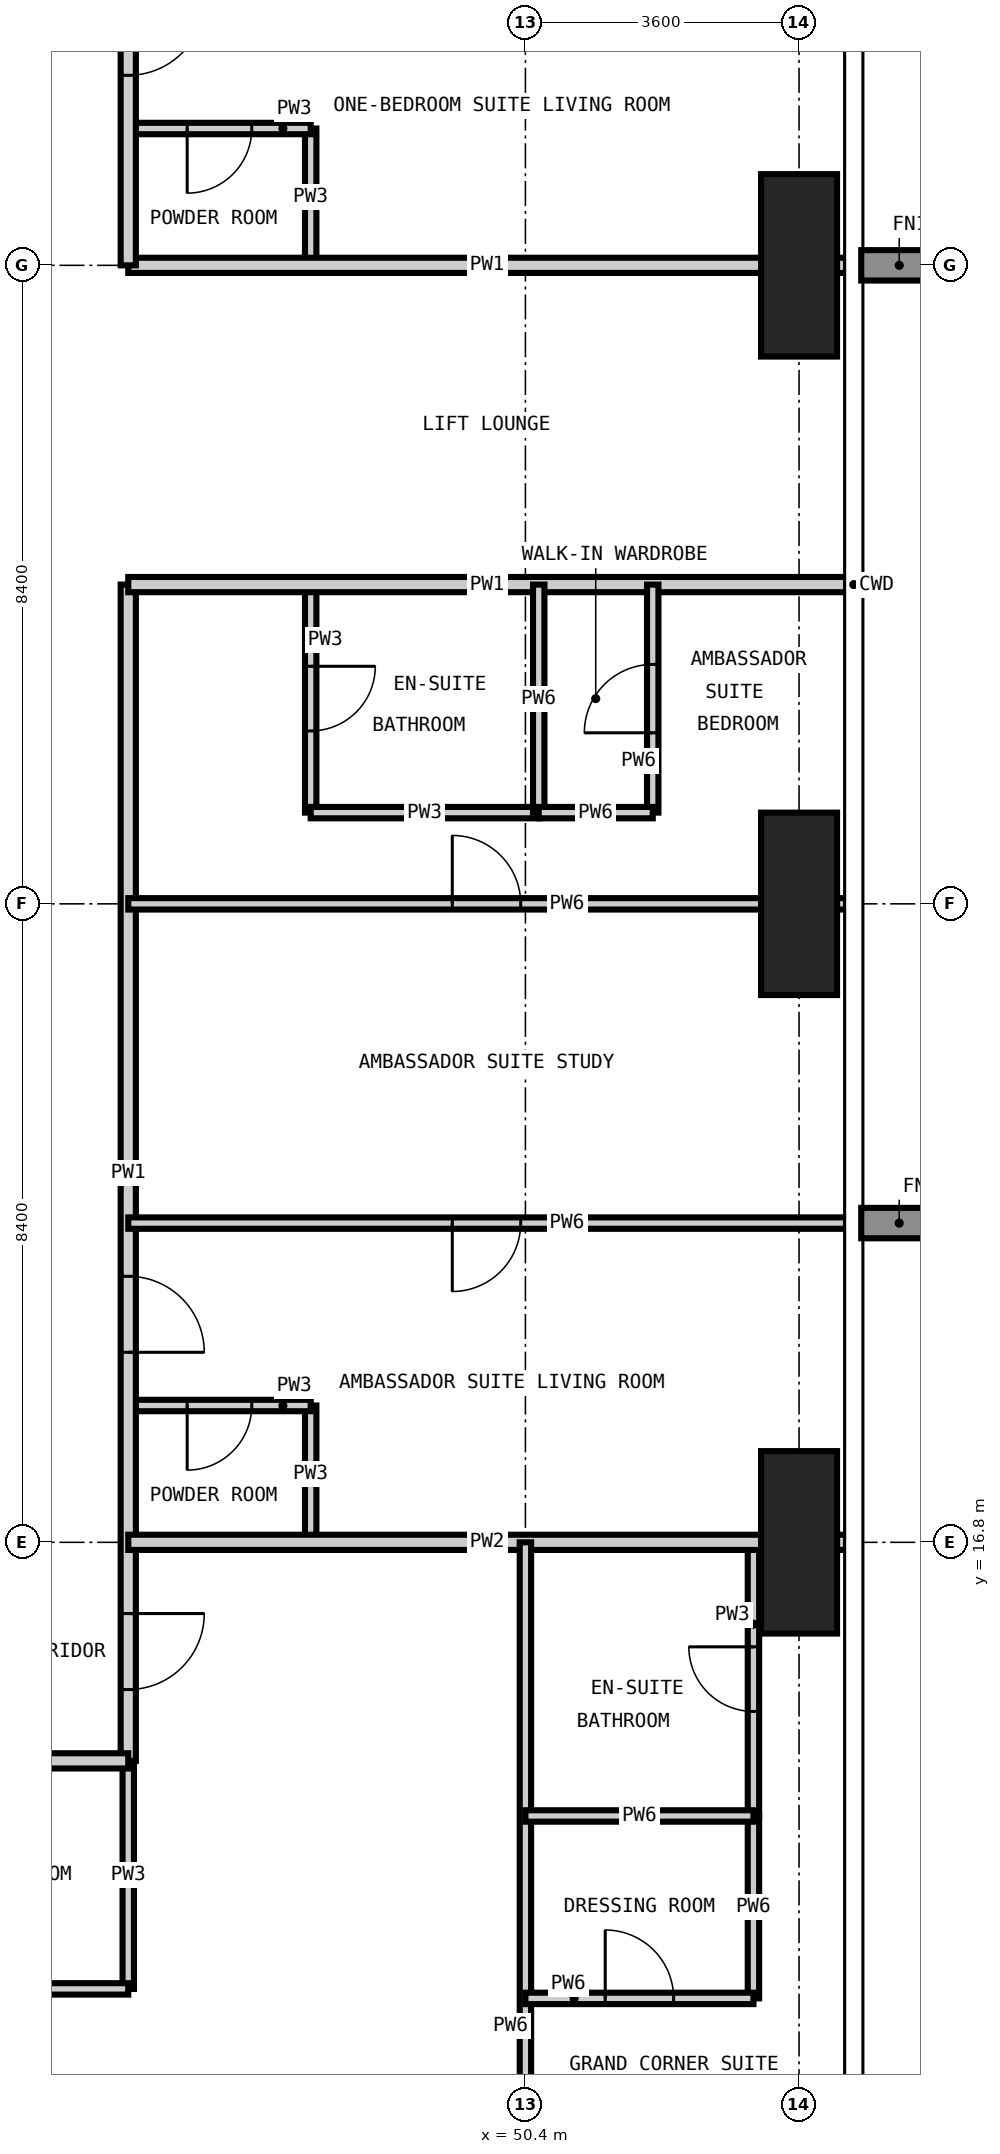
"""IFC4 building model, lengths in metres.
Left out: names, types, materials, properties, quantities, classifications, styles, units other than length and angle.
Written with IfcOpenShell. Run it as: python <this file> out.ifc"""

import sys

from ifc_helpers import new_model, si_unit, direction, frame, frame_2d, origin, origin_2d, place, context, subcontext, project, spatial, rectangle, extrude, element, fill, save


model = new_model("IFC4")
c1 = context("Model", 3, precision=1e-05, world=origin(), true_north=direction((0.0, 1.0)))
c2 = subcontext(c1, "Body", "Model", "MODEL_VIEW")
j1 = project(units=[si_unit("LENGTHUNIT", "METRE"), si_unit("PLANEANGLEUNIT", "RADIAN")], contexts=[c1])
p1 = place(None, origin())
s1 = spatial("IfcSite", under=j1, at=p1, CompositionType="ELEMENT")
p2 = place(p1, origin())
s2 = spatial("IfcBuilding", under=s1, at=p2, CompositionType="ELEMENT")
p3 = place(p2, frame((0.0, 0.0, 237.3)))
s3 = spatial("IfcBuildingStorey", under=s2, at=p3, CompositionType="ELEMENT", Elevation=237.3)
for number, where, z_axis, x_axis in (
    (1, (54.0, 16.8, -0.35), (0.0, 0.0, 1.0), (1.0, 0.0, 0.0)),
    (2, (54.0, 25.2, -0.35), (0.0, 0.0, 1.0), (1.0, 0.0, 0.0)),
    (3, (54.0, 33.6, -0.35), (0.0, 0.0, 1.0), (1.0, 0.0, 0.0)),
):
    element("IfcColumn", number, at=place(p3, frame(where, z_axis=z_axis, x_axis=x_axis)), inside=s3, PredefinedType="COLUMN", context=c2, shape_type="SweptSolid", body=[
        extrude(rectangle(XDim=1.0, YDim=2.4, at=origin_2d()), origin(), (0.0, 0.0, 1.0), 3.9),
    ])
p4 = place(p3, frame((45.175, 10.925, 0.0), z_axis=(0.0, 0.0, 1.0), x_axis=(0.0, 1.0, 0.0)))
e4 = element("IfcWall", 4, at=p4, inside=s3, PredefinedType="PARTITIONING", context=c2, shape_type="SweptSolid", body=[
    extrude(rectangle(XDim=3.0, YDim=0.15, at=frame_2d((1.5, 0.0))), origin(), (0.0, 0.0, 1.0), 3.55),
])
p5 = place(p3, frame((47.575, 16.8, 0.0), z_axis=(0.0, 0.0, 1.0), x_axis=(0.0, 1.0, 0.0)))
e5 = element("IfcWall", 5, at=p5, inside=s3, PredefinedType="PARTITIONING", context=c2, shape_type="SweptSolid", body=[
    extrude(rectangle(XDim=1.8, YDim=0.15, at=frame_2d((0.9, 0.0))), origin(), (0.0, 0.0, 1.0), 3.55),
])
p6 = place(p3, frame((47.575, 26.4, 0.0), z_axis=(0.0, 0.0, 1.0), x_axis=(0.0, 1.0, 0.0)))
e6 = element("IfcWall", 6, at=p6, inside=s3, PredefinedType="PARTITIONING", context=c2, shape_type="SweptSolid", body=[
    extrude(rectangle(XDim=3.0, YDim=0.15, at=frame_2d((1.5, 0.0))), origin(), (0.0, 0.0, 1.0), 3.55),
])
p7 = place(p6, frame((1.075, 0.0, 0.0)))
e7 = element("IfcOpeningElement", 7, at=p7, cuts=e6, PredefinedType="OPENING", context=c2, shape_type="SweptSolid", body=[
    extrude(rectangle(XDim=0.85, YDim=2.1, at=frame_2d((0.425, 1.05))), frame((0.0, 0.085, 0.0), z_axis=(0.0, -1.0, 0.0), x_axis=(1.0, 0.0, 0.0)), (0.0, 0.0, 1.0), 0.17),
])
p8 = place(p3, frame((47.575, 33.6, 0.0), z_axis=(0.0, 0.0, 1.0), x_axis=(0.0, 1.0, 0.0)))
e8 = element("IfcWall", 8, at=p8, inside=s3, PredefinedType="PARTITIONING", context=c2, shape_type="SweptSolid", body=[
    extrude(rectangle(XDim=1.8, YDim=0.15, at=frame_2d((0.9, 0.0))), origin(), (0.0, 0.0, 1.0), 3.55),
])
p9 = place(p3, frame((53.4, 13.2, 0.0), z_axis=(0.0, 0.0, 1.0), x_axis=(0.0, 1.0, 0.0)))
e9 = element("IfcWall", 9, at=p9, inside=s3, PredefinedType="PARTITIONING", context=c2, shape_type="SweptSolid", body=[
    extrude(rectangle(XDim=3.6, YDim=0.15, at=frame_2d((1.8, 0.0))), origin(), (0.0, 0.0, 1.0), 3.55),
])
p10 = place(p9, frame((1.375, 0.0, 0.0)))
e10 = element("IfcOpeningElement", 10, at=p10, cuts=e9, PredefinedType="OPENING", context=c2, shape_type="SweptSolid", body=[
    extrude(rectangle(XDim=0.85, YDim=2.1, at=frame_2d((0.425, 1.05))), frame((0.0, 0.085, 0.0), z_axis=(0.0, -1.0, 0.0), x_axis=(1.0, 0.0, 0.0)), (0.0, 0.0, 1.0), 0.17),
])
p11 = place(p3, frame((42.0, 10.925, 0.0), z_axis=(0.0, 0.0, 1.0), x_axis=(1.0, 0.0, 0.0)))
e11 = element("IfcWall", 11, at=p11, inside=s3, PredefinedType="PARTITIONING", context=c2, shape_type="SweptSolid", body=[
    extrude(rectangle(XDim=3.175, YDim=0.15, at=frame_2d((1.587, 0.0))), origin(), (0.0, 0.0, 1.0), 3.55),
])
p12 = place(p11, frame((1.163, 0.0, 0.0)))
e12 = element("IfcOpeningElement", 12, at=p12, cuts=e11, PredefinedType="OPENING", context=c2, shape_type="SweptSolid", body=[
    extrude(rectangle(XDim=0.85, YDim=2.1, at=frame_2d((0.425, 1.05))), frame((0.0, 0.085, 0.0), z_axis=(0.0, -1.0, 0.0), x_axis=(1.0, 0.0, 0.0)), (0.0, 0.0, 1.0), 0.17),
])
p13 = place(p3, frame((45.175, 18.6, 0.0), z_axis=(0.0, 0.0, 1.0), x_axis=(1.0, 0.0, 0.0)))
e13 = element("IfcWall", 13, at=p13, inside=s3, PredefinedType="PARTITIONING", context=c2, shape_type="SweptSolid", body=[
    extrude(rectangle(XDim=2.4, YDim=0.15, at=frame_2d((1.2, 0.0))), origin(), (0.0, 0.0, 1.0), 3.55),
])
p14 = place(p13, frame((0.775, 0.0, 0.0)))
e14 = element("IfcOpeningElement", 14, at=p14, cuts=e13, PredefinedType="OPENING", context=c2, shape_type="SweptSolid", body=[
    extrude(rectangle(XDim=0.85, YDim=2.1, at=frame_2d((0.425, 1.05))), frame((0.0, 0.085, 0.0), z_axis=(0.0, -1.0, 0.0), x_axis=(1.0, 0.0, 0.0)), (0.0, 0.0, 1.0), 0.17),
])
p15 = place(p3, frame((47.575, 26.4, 0.0), z_axis=(0.0, 0.0, 1.0), x_axis=(1.0, 0.0, 0.0)))
e15 = element("IfcWall", 15, at=p15, inside=s3, PredefinedType="PARTITIONING", context=c2, shape_type="SweptSolid", body=[
    extrude(rectangle(XDim=3.0, YDim=0.15, at=frame_2d((1.5, 0.0))), origin(), (0.0, 0.0, 1.0), 3.55),
])
p16 = place(p3, frame((45.175, 35.4, 0.0), z_axis=(0.0, 0.0, 1.0), x_axis=(1.0, 0.0, 0.0)))
e16 = element("IfcWall", 16, at=p16, inside=s3, PredefinedType="PARTITIONING", context=c2, shape_type="SweptSolid", body=[
    extrude(rectangle(XDim=2.4, YDim=0.15, at=frame_2d((1.2, 0.0))), origin(), (0.0, 0.0, 1.0), 3.55),
])
p17 = place(p16, frame((0.775, 0.0, 0.0)))
e17 = element("IfcOpeningElement", 17, at=p17, cuts=e16, PredefinedType="OPENING", context=c2, shape_type="SweptSolid", body=[
    extrude(rectangle(XDim=0.85, YDim=2.1, at=frame_2d((0.425, 1.05))), frame((0.0, 0.085, 0.0), z_axis=(0.0, -1.0, 0.0), x_axis=(1.0, 0.0, 0.0)), (0.0, 0.0, 1.0), 0.17),
])
p18 = place(p3, frame((45.175, 33.6, 0.0), z_axis=(0.0, 0.0, 1.0), x_axis=(1.0, 0.0, 0.0)))
e18 = element("IfcWall", 18, at=p18, inside=s3, PredefinedType="PARTITIONING", context=c2, shape_type="SweptSolid", body=[
    extrude(rectangle(XDim=9.443, YDim=0.2, at=frame_2d((4.721, 0.0))), origin(), (0.0, 0.0, 1.0), 3.55),
])
p19 = place(p3, frame((45.175, 29.4, 0.0), z_axis=(0.0, 0.0, 1.0), x_axis=(0.0, -1.0, 0.0)))
e19 = element("IfcWall", 19, at=p19, inside=s3, PredefinedType="PARTITIONING", context=c2, shape_type="SweptSolid", body=[
    extrude(rectangle(XDim=15.475, YDim=0.2, at=frame_2d((7.737, 0.0))), origin(), (0.0, 0.0, 1.0), 3.55),
])
p20 = place(p19, frame((9.1, 0.0, 0.0)))
e20 = element("IfcOpeningElement", 20, at=p20, cuts=e19, PredefinedType="OPENING", context=c2, shape_type="SweptSolid", body=[
    extrude(rectangle(XDim=1.0, YDim=2.2, at=frame_2d((0.5, 1.1))), frame((0.0, 0.11, 0.0), z_axis=(0.0, -1.0, 0.0), x_axis=(1.0, 0.0, 0.0)), (0.0, 0.0, 1.0), 0.22),
])
p21 = place(p19, frame((13.537, 0.0, 0.0)))
e21 = element("IfcOpeningElement", 21, at=p21, cuts=e19, PredefinedType="OPENING", context=c2, shape_type="SweptSolid", body=[
    extrude(rectangle(XDim=1.0, YDim=2.2, at=frame_2d((0.5, 1.1))), frame((0.0, 0.11, 0.0), z_axis=(0.0, -1.0, 0.0), x_axis=(1.0, 0.0, 0.0)), (0.0, 0.0, 1.0), 0.22),
])
p22 = place(p3, frame((45.175, 44.575, 0.0), z_axis=(0.0, 0.0, 1.0), x_axis=(0.0, -1.0, 0.0)))
e22 = element("IfcWall", 22, at=p22, inside=s3, PredefinedType="PARTITIONING", context=c2, shape_type="SweptSolid", body=[
    extrude(rectangle(XDim=10.975, YDim=0.2, at=frame_2d((5.487, 0.0))), origin(), (0.0, 0.0, 1.0), 3.55),
])
p23 = place(p22, frame((7.475, 0.0, 0.0)))
e23 = element("IfcOpeningElement", 23, at=p23, cuts=e22, PredefinedType="OPENING", context=c2, shape_type="SweptSolid", body=[
    extrude(rectangle(XDim=1.0, YDim=2.2, at=frame_2d((0.5, 1.1))), frame((0.0, 0.11, 0.0), z_axis=(0.0, -1.0, 0.0), x_axis=(1.0, 0.0, 0.0)), (0.0, 0.0, 1.0), 0.22),
])
p24 = place(p22, frame((0.787, 0.0, 0.0)))
e24 = element("IfcOpeningElement", 24, at=p24, cuts=e22, PredefinedType="OPENING", context=c2, shape_type="SweptSolid", body=[
    extrude(rectangle(XDim=1.0, YDim=2.2, at=frame_2d((0.5, 1.1))), frame((0.0, 0.11, 0.0), z_axis=(0.0, -1.0, 0.0), x_axis=(1.0, 0.0, 0.0)), (0.0, 0.0, 1.0), 0.22),
])
p25 = place(p3, frame((45.175, 13.925, 0.0), z_axis=(0.0, 0.0, 1.0), x_axis=(-1.0, 0.0, 0.0)))
e25 = element("IfcWall", 25, at=p25, inside=s3, PredefinedType="PARTITIONING", context=c2, shape_type="SweptSolid", body=[
    extrude(rectangle(XDim=22.85, YDim=0.2, at=frame_2d((11.425, 0.0))), origin(), (0.0, 0.0, 1.0), 3.55),
])
p26 = place(p25, frame((15.275, 0.0, 0.0)))
e26 = element("IfcOpeningElement", 26, at=p26, cuts=e25, PredefinedType="OPENING", context=c2, shape_type="SweptSolid", body=[
    extrude(rectangle(XDim=1.0, YDim=2.2, at=frame_2d((0.5, 1.1))), frame((0.0, 0.11, 0.0), z_axis=(0.0, -1.0, 0.0), x_axis=(1.0, 0.0, 0.0)), (0.0, 0.0, 1.0), 0.22),
])
p27 = place(p25, frame((6.875, 0.0, 0.0)))
e27 = element("IfcOpeningElement", 27, at=p27, cuts=e25, PredefinedType="OPENING", context=c2, shape_type="SweptSolid", body=[
    extrude(rectangle(XDim=1.0, YDim=2.2, at=frame_2d((0.5, 1.1))), frame((0.0, 0.11, 0.0), z_axis=(0.0, -1.0, 0.0), x_axis=(1.0, 0.0, 0.0)), (0.0, 0.0, 1.0), 0.22),
])
for number, where, z_axis, x_axis in (
    (28, (54.618, 29.4, 0.0), (0.0, 0.0, 1.0), (-1.0, 0.0, 0.0)),
    (29, (45.175, 16.8, 0.0), (0.0, 0.0, 1.0), (1.0, 0.0, 0.0)),
):
    element("IfcWall", number, at=place(p3, frame(where, z_axis=z_axis, x_axis=x_axis)), inside=s3, PredefinedType="PARTITIONING", context=c2, shape_type="SweptSolid", body=[
        extrude(rectangle(XDim=9.443, YDim=0.2, at=frame_2d((4.721, 0.0))), origin(), (0.0, 0.0, 1.0), 3.55),
    ])
p28 = place(p3, frame((50.4, 4.182, 0.0), z_axis=(0.0, 0.0, 1.0), x_axis=(0.0, 1.0, 0.0)))
e30 = element("IfcWall", 30, at=p28, inside=s3, PredefinedType="PARTITIONING", context=c2, shape_type="SweptSolid", body=[
    extrude(rectangle(XDim=12.618, YDim=0.15, at=frame_2d((6.309, 0.0))), origin(), (0.0, 0.0, 1.0), 3.55),
])
p29 = place(p28, frame((2.868, 0.0, 0.0)))
e31 = element("IfcOpeningElement", 31, at=p29, cuts=e30, PredefinedType="OPENING", context=c2, shape_type="SweptSolid", body=[
    extrude(rectangle(XDim=0.9, YDim=2.1, at=frame_2d((0.45, 1.05))), frame((0.0, 0.085, 0.0), z_axis=(0.0, -1.0, 0.0), x_axis=(1.0, 0.0, 0.0)), (0.0, 0.0, 1.0), 0.17),
])
p30 = place(p3, frame((50.575, 26.4, 0.0), z_axis=(0.0, 0.0, 1.0), x_axis=(0.0, 1.0, 0.0)))
e32 = element("IfcWall", 32, at=p30, inside=s3, PredefinedType="PARTITIONING", context=c2, shape_type="SweptSolid", body=[
    extrude(rectangle(XDim=3.0, YDim=0.15, at=frame_2d((1.5, 0.0))), origin(), (0.0, 0.0, 1.0), 3.55),
])
p31 = place(p3, frame((52.075, 26.4, 0.0), z_axis=(0.0, 0.0, 1.0), x_axis=(0.0, 1.0, 0.0)))
e33 = element("IfcWall", 33, at=p31, inside=s3, PredefinedType="PARTITIONING", context=c2, shape_type="SweptSolid", body=[
    extrude(rectangle(XDim=3.0, YDim=0.15, at=frame_2d((1.5, 0.0))), origin(), (0.0, 0.0, 1.0), 3.55),
])
p32 = place(p31, frame((1.05, 0.0, 0.0)))
e34 = element("IfcOpeningElement", 34, at=p32, cuts=e33, PredefinedType="OPENING", context=c2, shape_type="SweptSolid", body=[
    extrude(rectangle(XDim=0.9, YDim=2.1, at=frame_2d((0.45, 1.05))), frame((0.0, 0.085, 0.0), z_axis=(0.0, -1.0, 0.0), x_axis=(1.0, 0.0, 0.0)), (0.0, 0.0, 1.0), 0.17),
])
p33 = place(p3, frame((53.4, 10.8, 0.0), z_axis=(0.0, 0.0, 1.0), x_axis=(0.0, 1.0, 0.0)))
e35 = element("IfcWall", 35, at=p33, inside=s3, PredefinedType="PARTITIONING", context=c2, shape_type="SweptSolid", body=[
    extrude(rectangle(XDim=2.4, YDim=0.15, at=frame_2d((1.2, 0.0))), origin(), (0.0, 0.0, 1.0), 3.55),
])
p34 = place(p3, frame((50.4, 10.8, 0.0), z_axis=(0.0, 0.0, 1.0), x_axis=(1.0, 0.0, 0.0)))
e36 = element("IfcWall", 36, at=p34, inside=s3, PredefinedType="PARTITIONING", context=c2, shape_type="SweptSolid", body=[
    extrude(rectangle(XDim=3.0, YDim=0.15, at=frame_2d((1.5, 0.0))), origin(), (0.0, 0.0, 1.0), 3.55),
])
p35 = place(p34, frame((1.05, 0.0, 0.0)))
e37 = element("IfcOpeningElement", 37, at=p35, cuts=e36, PredefinedType="OPENING", context=c2, shape_type="SweptSolid", body=[
    extrude(rectangle(XDim=0.9, YDim=2.1, at=frame_2d((0.45, 1.05))), frame((0.0, 0.085, 0.0), z_axis=(0.0, -1.0, 0.0), x_axis=(1.0, 0.0, 0.0)), (0.0, 0.0, 1.0), 0.17),
])
p36 = place(p3, frame((50.4, 13.2, 0.0), z_axis=(0.0, 0.0, 1.0), x_axis=(1.0, 0.0, 0.0)))
e38 = element("IfcWall", 38, at=p36, inside=s3, PredefinedType="PARTITIONING", context=c2, shape_type="SweptSolid", body=[
    extrude(rectangle(XDim=3.0, YDim=0.15, at=frame_2d((1.5, 0.0))), origin(), (0.0, 0.0, 1.0), 3.55),
])
p37 = place(p3, frame((45.175, 21.0, 0.0), z_axis=(0.0, 0.0, 1.0), x_axis=(1.0, 0.0, 0.0)))
e39 = element("IfcWall", 39, at=p37, inside=s3, PredefinedType="PARTITIONING", context=c2, shape_type="SweptSolid", body=[
    extrude(rectangle(XDim=9.443, YDim=0.15, at=frame_2d((4.721, 0.0))), origin(), (0.0, 0.0, 1.0), 3.55),
])
p38 = place(p37, frame((4.263, 0.0, 0.0)))
e40 = element("IfcOpeningElement", 40, at=p38, cuts=e39, PredefinedType="OPENING", context=c2, shape_type="SweptSolid", body=[
    extrude(rectangle(XDim=0.9, YDim=2.1, at=frame_2d((0.45, 1.05))), frame((0.0, 0.085, 0.0), z_axis=(0.0, -1.0, 0.0), x_axis=(1.0, 0.0, 0.0)), (0.0, 0.0, 1.0), 0.17),
])
p39 = place(p3, frame((45.175, 25.2, 0.0), z_axis=(0.0, 0.0, 1.0), x_axis=(1.0, 0.0, 0.0)))
e41 = element("IfcWall", 41, at=p39, inside=s3, PredefinedType="PARTITIONING", context=c2, shape_type="SweptSolid", body=[
    extrude(rectangle(XDim=9.443, YDim=0.15, at=frame_2d((4.721, 0.0))), origin(), (0.0, 0.0, 1.0), 3.55),
])
p40 = place(p39, frame((4.263, 0.0, 0.0)))
e42 = element("IfcOpeningElement", 42, at=p40, cuts=e41, PredefinedType="OPENING", context=c2, shape_type="SweptSolid", body=[
    extrude(rectangle(XDim=0.9, YDim=2.1, at=frame_2d((0.45, 1.05))), frame((0.0, 0.085, 0.0), z_axis=(0.0, -1.0, 0.0), x_axis=(1.0, 0.0, 0.0)), (0.0, 0.0, 1.0), 0.17),
])
p41 = place(p3, frame((50.575, 26.4, 0.0), z_axis=(0.0, 0.0, 1.0), x_axis=(1.0, 0.0, 0.0)))
e43 = element("IfcWall", 43, at=p41, inside=s3, PredefinedType="PARTITIONING", context=c2, shape_type="SweptSolid", body=[
    extrude(rectangle(XDim=1.5, YDim=0.15, at=frame_2d((0.75, 0.0))), origin(), (0.0, 0.0, 1.0), 3.55),
])
p42 = place(p20, origin())
e44 = element("IfcDoor", 44, at=p42, inside=s3, OperationType="SINGLE_SWING_RIGHT", PredefinedType="DOOR", context=c2, shape_type="SweptSolid", body=[
    extrude(rectangle(XDim=1.0, YDim=2.2, at=frame_2d((0.5, 1.1))), frame((0.0, 0.025, 0.0), z_axis=(0.0, -1.0, 0.0), x_axis=(1.0, 0.0, 0.0)), (0.0, 0.0, 1.0), 0.05),
])
fill(e20, e44)
p43 = place(p14, frame((0.85, 0.0, 0.0), z_axis=(0.0, 0.0, 1.0), x_axis=(-1.0, 0.0, 0.0)))
e45 = element("IfcDoor", 45, at=p43, inside=s3, OperationType="SINGLE_SWING_RIGHT", PredefinedType="DOOR", context=c2, shape_type="SweptSolid", body=[
    extrude(rectangle(XDim=0.85, YDim=2.1, at=frame_2d((0.425, 1.05))), frame((0.0, 0.025, 0.0), z_axis=(0.0, -1.0, 0.0), x_axis=(1.0, 0.0, 0.0)), (0.0, 0.0, 1.0), 0.05),
])
fill(e14, e45)
p44 = place(p38, frame((0.9, 0.0, 0.0), z_axis=(0.0, 0.0, 1.0), x_axis=(-1.0, 0.0, 0.0)))
e46 = element("IfcDoor", 46, at=p44, inside=s3, OperationType="SINGLE_SWING_RIGHT", PredefinedType="DOOR", context=c2, shape_type="SweptSolid", body=[
    extrude(rectangle(XDim=0.9, YDim=2.1, at=frame_2d((0.45, 1.05))), frame((0.0, 0.025, 0.0), z_axis=(0.0, -1.0, 0.0), x_axis=(1.0, 0.0, 0.0)), (0.0, 0.0, 1.0), 0.05),
])
fill(e40, e46)
p45 = place(p40, origin())
e47 = element("IfcDoor", 47, at=p45, inside=s3, OperationType="SINGLE_SWING_LEFT", PredefinedType="DOOR", context=c2, shape_type="SweptSolid", body=[
    extrude(rectangle(XDim=0.9, YDim=2.1, at=frame_2d((0.45, 1.05))), frame((0.0, 0.025, 0.0), z_axis=(0.0, -1.0, 0.0), x_axis=(1.0, 0.0, 0.0)), (0.0, 0.0, 1.0), 0.05),
])
fill(e42, e47)
p46 = place(p7, frame((0.85, 0.0, 0.0), z_axis=(0.0, 0.0, 1.0), x_axis=(-1.0, 0.0, 0.0)))
e48 = element("IfcDoor", 48, at=p46, inside=s3, OperationType="SINGLE_SWING_LEFT", PredefinedType="DOOR", context=c2, shape_type="SweptSolid", body=[
    extrude(rectangle(XDim=0.85, YDim=2.1, at=frame_2d((0.425, 1.05))), frame((0.0, 0.025, 0.0), z_axis=(0.0, -1.0, 0.0), x_axis=(1.0, 0.0, 0.0)), (0.0, 0.0, 1.0), 0.05),
])
fill(e7, e48)
p47 = place(p32, origin())
e49 = element("IfcDoor", 49, at=p47, inside=s3, OperationType="SINGLE_SWING_LEFT", PredefinedType="DOOR", context=c2, shape_type="SweptSolid", body=[
    extrude(rectangle(XDim=0.9, YDim=2.1, at=frame_2d((0.45, 1.05))), frame((0.0, 0.025, 0.0), z_axis=(0.0, -1.0, 0.0), x_axis=(1.0, 0.0, 0.0)), (0.0, 0.0, 1.0), 0.05),
])
fill(e34, e49)
p48 = place(p23, origin())
e50 = element("IfcDoor", 50, at=p48, inside=s3, OperationType="SINGLE_SWING_LEFT", PredefinedType="DOOR", context=c2, shape_type="SweptSolid", body=[
    extrude(rectangle(XDim=1.0, YDim=2.2, at=frame_2d((0.5, 1.1))), frame((0.0, 0.025, 0.0), z_axis=(0.0, -1.0, 0.0), x_axis=(1.0, 0.0, 0.0)), (0.0, 0.0, 1.0), 0.05),
])
fill(e23, e50)
p49 = place(p17, frame((0.85, 0.0, 0.0), z_axis=(0.0, 0.0, 1.0), x_axis=(-1.0, 0.0, 0.0)))
e51 = element("IfcDoor", 51, at=p49, inside=s3, OperationType="SINGLE_SWING_RIGHT", PredefinedType="DOOR", context=c2, shape_type="SweptSolid", body=[
    extrude(rectangle(XDim=0.85, YDim=2.1, at=frame_2d((0.425, 1.05))), frame((0.0, 0.025, 0.0), z_axis=(0.0, -1.0, 0.0), x_axis=(1.0, 0.0, 0.0)), (0.0, 0.0, 1.0), 0.05),
])
fill(e17, e51)
p50 = place(p21, origin())
e52 = element("IfcDoor", 52, at=p50, inside=s3, OperationType="SINGLE_SWING_LEFT", PredefinedType="DOOR", context=c2, shape_type="SweptSolid", body=[
    extrude(rectangle(XDim=1.0, YDim=2.2, at=frame_2d((0.5, 1.1))), frame((0.0, 0.025, 0.0), z_axis=(0.0, -1.0, 0.0), x_axis=(1.0, 0.0, 0.0)), (0.0, 0.0, 1.0), 0.05),
])
fill(e21, e52)
p51 = place(p10, origin())
e53 = element("IfcDoor", 53, at=p51, inside=s3, OperationType="SINGLE_SWING_RIGHT", PredefinedType="DOOR", context=c2, shape_type="SweptSolid", body=[
    extrude(rectangle(XDim=0.85, YDim=2.1, at=frame_2d((0.425, 1.05))), frame((0.0, 0.025, 0.0), z_axis=(0.0, -1.0, 0.0), x_axis=(1.0, 0.0, 0.0)), (0.0, 0.0, 1.0), 0.05),
])
fill(e10, e53)
p52 = place(p35, origin())
e54 = element("IfcDoor", 54, at=p52, inside=s3, OperationType="SINGLE_SWING_LEFT", PredefinedType="DOOR", context=c2, shape_type="SweptSolid", body=[
    extrude(rectangle(XDim=0.9, YDim=2.1, at=frame_2d((0.45, 1.05))), frame((0.0, 0.025, 0.0), z_axis=(0.0, -1.0, 0.0), x_axis=(1.0, 0.0, 0.0)), (0.0, 0.0, 1.0), 0.05),
])
fill(e37, e54)
save(model, sys.argv[1])
